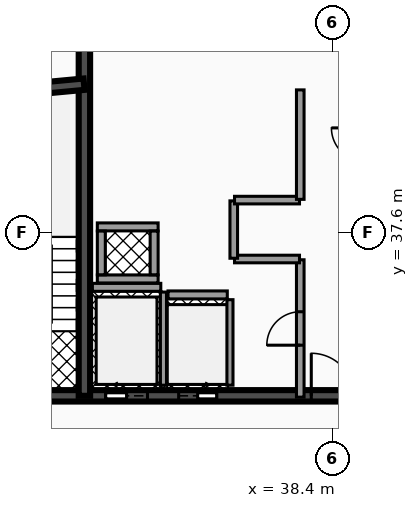
"""IFC4 building model, lengths in metres.
Left out: names, types, materials, properties, quantities, classifications, styles, units other than length and angle.
Written with IfcOpenShell. Run it as: python <this file> out.ifc"""

import sys

from ifc_helpers import new_model, si_unit, direction, frame, frame_2d, origin, place, context, subcontext, project, spatial, rectangle, extrude, element, fill, save


model = new_model("IFC4")
c1 = context("Model", 3, precision=1e-05, world=origin(), true_north=direction((0.0, 1.0)))
c2 = subcontext(c1, "Body", "Model", "MODEL_VIEW")
j1 = project(units=[si_unit("LENGTHUNIT", "METRE"), si_unit("PLANEANGLEUNIT", "RADIAN")], contexts=[c1])
p1 = place(None, origin())
s1 = spatial("IfcSite", under=j1, at=p1, CompositionType="ELEMENT")
p2 = place(p1, origin())
s2 = spatial("IfcBuilding", under=s1, at=p2, CompositionType="ELEMENT")
p3 = place(p2, frame((0.0, 0.0, 249.56)))
s3 = spatial("IfcBuildingStorey", under=s2, at=p3, CompositionType="ELEMENT", Elevation=249.56)
p4 = place(p3, frame((28.5, 33.3, 0.0), z_axis=(0.0, 0.0, 1.0), x_axis=(1.0, 0.0, 0.0)))
e1 = element("IfcWall", 1, at=p4, inside=s3, PredefinedType="SHEAR", context=c2, shape_type="SweptSolid", body=[
    extrude(rectangle(XDim=19.86, YDim=0.3, at=frame_2d((9.93, 0.0))), origin(), (0.0, 0.0, 1.0), 3.05),
])
p5 = place(p4, frame((3.93, 0.0, 0.0)))
e2 = element("IfcOpeningElement", 2, at=p5, cuts=e1, PredefinedType="OPENING", context=c2, shape_type="SweptSolid", body=[
    extrude(rectangle(XDim=1.1, YDim=2.15, at=frame_2d((0.55, 1.075))), frame((0.0, 0.16, 0.0), z_axis=(0.0, -1.0, 0.0), x_axis=(1.0, 0.0, 0.0)), (0.0, 0.0, 1.0), 0.32),
])
p6 = place(p4, frame((14.77, 0.0, 0.0)))
e3 = element("IfcOpeningElement", 3, at=p6, cuts=e1, PredefinedType="OPENING", context=c2, shape_type="SweptSolid", body=[
    extrude(rectangle(XDim=1.1, YDim=2.15, at=frame_2d((0.55, 1.075))), frame((0.0, 0.16, 0.0), z_axis=(0.0, -1.0, 0.0), x_axis=(1.0, 0.0, 0.0)), (0.0, 0.0, 1.0), 0.32),
])
p7 = place(p4, frame((11.25, 0.0, 0.0)))
e4 = element("IfcOpeningElement", 4, at=p7, cuts=e1, PredefinedType="OPENING", context=c2, shape_type="SweptSolid", body=[
    extrude(rectangle(XDim=1.0, YDim=2.1, at=frame_2d((0.5, 1.05))), frame((0.0, 0.16, 0.0), z_axis=(0.0, -1.0, 0.0), x_axis=(1.0, 0.0, 0.0)), (0.0, 0.0, 1.0), 0.32),
])
p8 = place(p4, frame((12.95, 0.0, 0.0)))
e5 = element("IfcOpeningElement", 5, at=p8, cuts=e1, PredefinedType="OPENING", context=c2, shape_type="SweptSolid", body=[
    extrude(rectangle(XDim=1.0, YDim=2.1, at=frame_2d((0.5, 1.05))), frame((0.0, 0.16, 0.0), z_axis=(0.0, -1.0, 0.0), x_axis=(1.0, 0.0, 0.0)), (0.0, 0.0, 1.0), 0.32),
])
p9 = place(p4, frame((5.85, 0.0, 0.0)))
e6 = element("IfcOpeningElement", 6, at=p9, cuts=e1, PredefinedType="OPENING", context=c2, shape_type="SweptSolid", body=[
    extrude(rectangle(XDim=1.0, YDim=2.1, at=frame_2d((0.5, 1.05))), frame((0.0, 0.16, 0.0), z_axis=(0.0, -1.0, 0.0), x_axis=(1.0, 0.0, 0.0)), (0.0, 0.0, 1.0), 0.32),
])
p10 = place(p4, frame((1.21, 0.0, 0.0)))
e7 = element("IfcOpeningElement", 7, at=p10, cuts=e1, PredefinedType="OPENING", context=c2, shape_type="SweptSolid", body=[
    extrude(rectangle(XDim=1.1, YDim=2.2, at=frame_2d((0.55, 1.1))), frame((0.0, 0.16, 0.0), z_axis=(0.0, -1.0, 0.0), x_axis=(1.0, 0.0, 0.0)), (0.0, 0.0, 1.0), 0.32),
])
p11 = place(p4, frame((9.34, 0.0, 0.0)))
e8 = element("IfcOpeningElement", 8, at=p11, cuts=e1, PredefinedType="OPENING", context=c2, shape_type="SweptSolid", body=[
    extrude(rectangle(XDim=1.12, YDim=2.05, at=frame_2d((0.56, 1.025))), frame((0.0, 0.16, 0.0), z_axis=(0.0, -1.0, 0.0), x_axis=(1.0, 0.0, 0.0)), (0.0, 0.0, 1.0), 0.32),
])
p12 = place(p4, frame((17.55, 0.0, 0.0)))
e9 = element("IfcOpeningElement", 9, at=p12, cuts=e1, PredefinedType="OPENING", context=c2, shape_type="SweptSolid", body=[
    extrude(rectangle(XDim=1.1, YDim=2.2, at=frame_2d((0.55, 1.1))), frame((0.0, 0.16, 0.0), z_axis=(0.0, -1.0, 0.0), x_axis=(1.0, 0.0, 0.0)), (0.0, 0.0, 1.0), 0.32),
])
p13 = place(p3, frame((31.87, 33.3, 0.0), z_axis=(0.0, 0.0, 1.0), x_axis=(0.0, 1.0, 0.0)))
e10 = element("IfcWall", 10, at=p13, inside=s3, PredefinedType="SHEAR", context=c2, shape_type="SweptSolid", body=[
    extrude(rectangle(XDim=10.1, YDim=0.3, at=frame_2d((5.05, 0.0))), origin(), (0.0, 0.0, 1.0), 3.05),
])
p14 = place(p3, frame((28.64, 41.2, 0.0), z_axis=(0.0, 0.0, 1.0), x_axis=(0.995687118776, 0.092774789157, 0.0)))
e11 = element("IfcWall", 11, at=p14, inside=s3, PredefinedType="SHEAR", context=c2, shape_type="SweptSolid", body=[
    extrude(rectangle(XDim=3.234, YDim=0.3, at=frame_2d((1.617, 0.0))), origin(), (0.0, 0.0, 1.0), 3.05),
])
p15 = place(p3, frame((32.08, 36.155, 0.0), z_axis=(0.0, 0.0, 1.0), x_axis=(1.0, 0.0, 0.0)))
e12 = element("IfcWall", 12, at=p15, inside=s3, PredefinedType="SOLIDWALL", context=c2, shape_type="SweptSolid", body=[
    extrude(rectangle(XDim=1.8, YDim=0.21, at=frame_2d((0.9, 0.0))), origin(), (0.0, 0.0, 1.0), 3.05),
])
p16 = place(p3, frame((33.95, 33.58, 0.0), z_axis=(0.0, 0.0, 1.0), x_axis=(0.0, 1.0, 0.0)))
e13 = element("IfcWall", 13, at=p16, inside=s3, PredefinedType="SOLIDWALL", context=c2, shape_type="SweptSolid", body=[
    extrude(rectangle(XDim=2.45, YDim=0.16, at=frame_2d((1.225, 0.0))), origin(), (0.0, 0.0, 1.0), 3.05),
])
p17 = place(p3, frame((34.07, 35.955, 0.0), z_axis=(0.0, 0.0, 1.0), x_axis=(1.0, 0.0, 0.0)))
e14 = element("IfcWall", 14, at=p17, inside=s3, PredefinedType="SOLIDWALL", context=c2, shape_type="SweptSolid", body=[
    extrude(rectangle(XDim=1.56, YDim=0.21, at=frame_2d((0.78, 0.0))), origin(), (0.0, 0.0, 1.0), 3.05),
])
p18 = place(p3, frame((35.7, 33.58, 0.0), z_axis=(0.0, 0.0, 1.0), x_axis=(0.0, 1.0, 0.0)))
e15 = element("IfcWall", 15, at=p18, inside=s3, PredefinedType="SOLIDWALL", context=c2, shape_type="SweptSolid", body=[
    extrude(rectangle(XDim=2.25, YDim=0.16, at=frame_2d((1.125, 0.0))), origin(), (0.0, 0.0, 1.0), 3.05),
])
for number, where, z_axis, x_axis in (
    (16, (32.21, 36.375, 0.0), (0.0, 0.0, 1.0), (1.0, 0.0, 0.0)),
    (17, (32.21, 37.745, 0.0), (0.0, 0.0, 1.0), (1.0, 0.0, 0.0)),
):
    element("IfcWall", number, at=place(p3, frame(where, z_axis=z_axis, x_axis=x_axis)), inside=s3, PredefinedType="SOLIDWALL", context=c2, shape_type="SweptSolid", body=[
        extrude(rectangle(XDim=1.6, YDim=0.21, at=frame_2d((0.8, 0.0))), origin(), (0.0, 0.0, 1.0), 3.05),
    ])
for number, where, z_axis, x_axis in (
    (18, (32.315, 36.485, 0.0), (0.0, 0.0, 1.0), (0.0, 1.0, 0.0)),
    (19, (33.705, 36.485, 0.0), (0.0, 0.0, 1.0), (0.0, 1.0, 0.0)),
):
    element("IfcWall", number, at=place(p3, frame(where, z_axis=z_axis, x_axis=x_axis)), inside=s3, PredefinedType="SOLIDWALL", context=c2, shape_type="SweptSolid", body=[
        extrude(rectangle(XDim=1.15, YDim=0.21, at=frame_2d((0.575, 0.0))), origin(), (0.0, 0.0, 1.0), 3.05),
    ])
p19 = place(p3, frame((37.55, 33.265, 0.0), z_axis=(0.0, 0.0, 1.0), x_axis=(0.0, 1.0, 0.0)))
e20 = element("IfcWall", 20, at=p19, inside=s3, PredefinedType="PARTITIONING", context=c2, shape_type="SweptSolid", body=[
    extrude(rectangle(XDim=3.615, YDim=0.2, at=frame_2d((1.808, 0.0))), origin(), (0.0, 0.0, 1.0), 2.2),
])
p20 = place(p19, frame((1.367, 0.0, 0.0)))
e21 = element("IfcOpeningElement", 21, at=p20, cuts=e20, PredefinedType="OPENING", context=c2, shape_type="SweptSolid", body=[
    extrude(rectangle(XDim=0.88, YDim=2.05, at=frame_2d((0.44, 1.025))), frame((0.0, 0.11, 0.0), z_axis=(0.0, -1.0, 0.0), x_axis=(1.0, 0.0, 0.0)), (0.0, 0.0, 1.0), 0.22),
])
p21 = place(p3, frame((35.82, 36.9, 0.0), z_axis=(0.0, 0.0, 1.0), x_axis=(1.0, 0.0, 0.0)))
e22 = element("IfcWall", 22, at=p21, inside=s3, PredefinedType="PARTITIONING", context=c2, shape_type="SweptSolid", body=[
    extrude(rectangle(XDim=1.71, YDim=0.2, at=frame_2d((0.855, 0.0))), origin(), (0.0, 0.0, 1.0), 2.2),
])
p22 = place(p3, frame((35.8, 36.92, 0.0), z_axis=(0.0, 0.0, 1.0), x_axis=(0.0, 1.0, 0.0)))
e23 = element("IfcWall", 23, at=p22, inside=s3, PredefinedType="PARTITIONING", context=c2, shape_type="SweptSolid", body=[
    extrude(rectangle(XDim=1.51, YDim=0.2, at=frame_2d((0.755, 0.0))), origin(), (0.0, 0.0, 1.0), 2.2),
])
p23 = place(p3, frame((35.82, 38.45, 0.0), z_axis=(0.0, 0.0, 1.0), x_axis=(1.0, 0.0, 0.0)))
e24 = element("IfcWall", 24, at=p23, inside=s3, PredefinedType="PARTITIONING", context=c2, shape_type="SweptSolid", body=[
    extrude(rectangle(XDim=1.71, YDim=0.2, at=frame_2d((0.855, 0.0))), origin(), (0.0, 0.0, 1.0), 2.2),
])
p24 = place(p3, frame((37.55, 38.47, 0.0), z_axis=(0.0, 0.0, 1.0), x_axis=(0.0, 1.0, 0.0)))
e25 = element("IfcWall", 25, at=p24, inside=s3, PredefinedType="PARTITIONING", context=c2, shape_type="SweptSolid", body=[
    extrude(rectangle(XDim=2.88, YDim=0.2, at=frame_2d((1.44, 0.0))), origin(), (0.0, 0.0, 1.0), 2.2),
])
p25 = place(p5, origin())
e26 = element("IfcDoor", 26, at=p25, inside=s3, OperationType="SLIDING_TO_LEFT", PredefinedType="DOOR", context=c2, shape_type="SweptSolid", body=[
    extrude(rectangle(XDim=1.1, YDim=2.15, at=frame_2d((0.55, 1.075))), frame((0.0, 0.025, 0.0), z_axis=(0.0, -1.0, 0.0), x_axis=(1.0, 0.0, 0.0)), (0.0, 0.0, 1.0), 0.05),
])
fill(e2, e26)
p26 = place(p9, origin())
e27 = element("IfcDoor", 27, at=p26, inside=s3, OperationType="SLIDING_TO_RIGHT", PredefinedType="DOOR", context=c2, shape_type="SweptSolid", body=[
    extrude(rectangle(XDim=1.0, YDim=2.1, at=frame_2d((0.5, 1.05))), frame((0.0, 0.025, 0.0), z_axis=(0.0, -1.0, 0.0), x_axis=(1.0, 0.0, 0.0)), (0.0, 0.0, 1.0), 0.05),
])
fill(e6, e27)
p27 = place(p11, origin())
e28 = element("IfcDoor", 28, at=p27, inside=s3, OperationType="SINGLE_SWING_LEFT", PredefinedType="DOOR", context=c2, shape_type="SweptSolid", body=[
    extrude(rectangle(XDim=1.12, YDim=2.05, at=frame_2d((0.56, 1.025))), frame((0.0, 0.025, 0.0), z_axis=(0.0, -1.0, 0.0), x_axis=(1.0, 0.0, 0.0)), (0.0, 0.0, 1.0), 0.05),
])
fill(e8, e28)
p28 = place(p20, origin())
e29 = element("IfcDoor", 29, at=p28, inside=s3, OperationType="SINGLE_SWING_LEFT", PredefinedType="DOOR", context=c2, shape_type="SweptSolid", body=[
    extrude(rectangle(XDim=0.88, YDim=2.05, at=frame_2d((0.44, 1.025))), frame((0.0, 0.025, 0.0), z_axis=(0.0, -1.0, 0.0), x_axis=(1.0, 0.0, 0.0)), (0.0, 0.0, 1.0), 0.05),
])
fill(e21, e29)
save(model, sys.argv[1])
